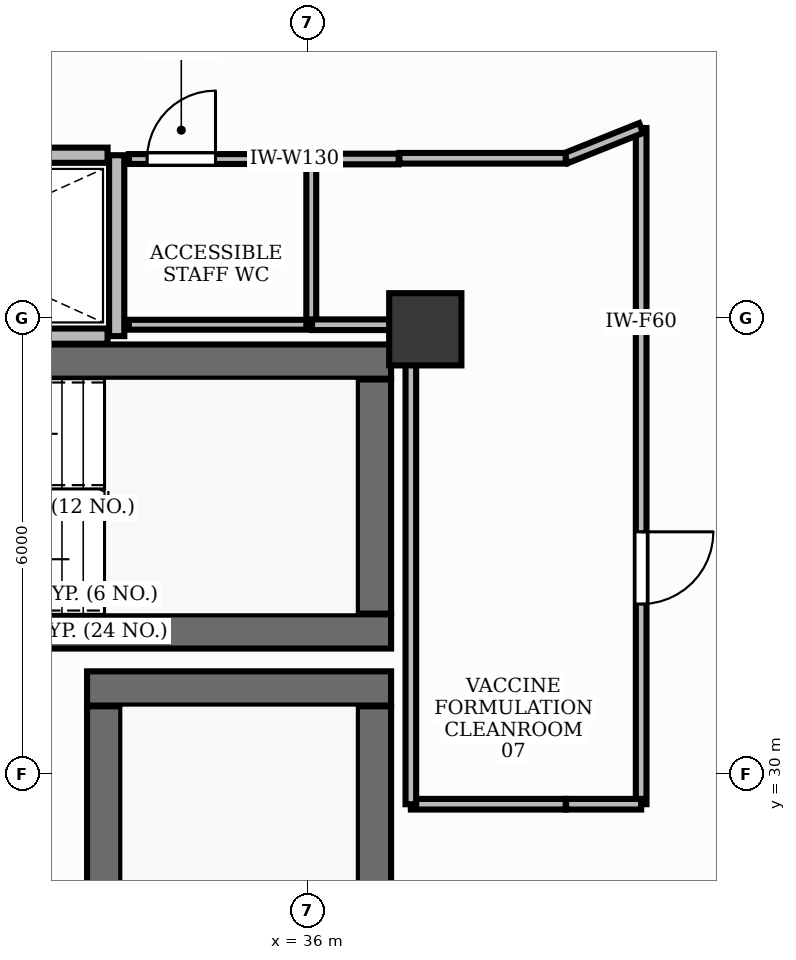
"""IFC4 building model, lengths in metres.
Left out: names, types, materials, properties, quantities, classifications, styles, units other than length and angle.
Written with IfcOpenShell. Run it as: python <this file> out.ifc"""

import sys

from ifc_helpers import new_model, si_unit, direction, frame, frame_2d, origin, origin_2d, place, context, subcontext, project, spatial, rectangle, extrude, element, fill, save


model = new_model("IFC4")
c1 = context("Model", 3, precision=1e-05, world=origin(), true_north=direction((0.0, 1.0)))
c2 = subcontext(c1, "Body", "Model", "MODEL_VIEW")
j1 = project(units=[si_unit("LENGTHUNIT", "METRE"), si_unit("PLANEANGLEUNIT", "RADIAN")], contexts=[c1])
p1 = place(None, origin())
s1 = spatial("IfcSite", under=j1, at=p1, CompositionType="ELEMENT")
p2 = place(p1, origin())
s2 = spatial("IfcBuilding", under=s1, at=p2, CompositionType="ELEMENT")
p3 = place(p2, frame((0.0, 0.0, 98.4)))
s3 = spatial("IfcBuildingStorey", under=s2, at=p3, CompositionType="ELEMENT", Elevation=98.4)
p4 = place(p3, frame((28.852, 35.425, 0.0), z_axis=(0.0, 0.0, 1.0), x_axis=(1.0, 0.0, 0.0)))
e1 = element("IfcWall", 1, at=p4, inside=s3, PredefinedType="SHEAR", context=c2, shape_type="SweptSolid", body=[
    extrude(rectangle(XDim=8.248, YDim=0.45, at=frame_2d((4.124, 0.0))), origin(), (0.0, 0.0, 1.0), 3.9),
])
p5 = place(p3, frame((28.35, 31.875, 0.0), z_axis=(0.0, 0.0, 1.0), x_axis=(1.0, 0.0, 0.0)))
e2 = element("IfcWall", 2, at=p5, inside=s3, PredefinedType="SHEAR", context=c2, shape_type="SweptSolid", body=[
    extrude(rectangle(XDim=8.75, YDim=0.45, at=frame_2d((4.375, 0.0))), origin(), (0.0, 0.0, 1.0), 3.9),
])
p6 = place(p3, frame((36.875, 32.11, 0.0), z_axis=(0.0, 0.0, 1.0), x_axis=(0.0, 1.0, 0.0)))
e3 = element("IfcWall", 3, at=p6, inside=s3, PredefinedType="SHEAR", context=c2, shape_type="SweptSolid", body=[
    extrude(rectangle(XDim=3.08, YDim=0.45, at=frame_2d((1.54, 0.0))), origin(), (0.0, 0.0, 1.0), 3.9),
])
p7 = place(p3, frame((33.1, 31.125, 0.0), z_axis=(0.0, 0.0, 1.0), x_axis=(1.0, 0.0, 0.0)))
e4 = element("IfcWall", 4, at=p7, inside=s3, PredefinedType="SHEAR", context=c2, shape_type="SweptSolid", body=[
    extrude(rectangle(XDim=4.0, YDim=0.45, at=frame_2d((2.0, 0.0))), origin(), (0.0, 0.0, 1.0), 3.9),
])
p8 = place(p3, frame((36.875, 23.11, 0.0), z_axis=(0.0, 0.0, 1.0), x_axis=(0.0, 1.0, 0.0)))
e5 = element("IfcWall", 5, at=p8, inside=s3, PredefinedType="SHEAR", context=c2, shape_type="SweptSolid", body=[
    extrude(rectangle(XDim=7.78, YDim=0.45, at=frame_2d((3.89, 0.0))), origin(), (0.0, 0.0, 1.0), 3.9),
])
p9 = place(p3, frame((33.325, 23.11, 0.0), z_axis=(0.0, 0.0, 1.0), x_axis=(0.0, 1.0, 0.0)))
e6 = element("IfcWall", 6, at=p9, inside=s3, PredefinedType="SHEAR", context=c2, shape_type="SweptSolid", body=[
    extrude(rectangle(XDim=7.78, YDim=0.45, at=frame_2d((3.89, 0.0))), origin(), (0.0, 0.0, 1.0), 3.9),
])
p10 = place(p9, frame((0.2, 0.0, 0.0)))
e7 = element("IfcOpeningElement", 7, at=p10, cuts=e6, PredefinedType="OPENING", context=c2, shape_type="SweptSolid", body=[
    extrude(rectangle(XDim=1.05, YDim=2.15, at=frame_2d((0.525, 1.075))), frame((0.0, 0.24, 0.0), z_axis=(0.0, -1.0, 0.0), x_axis=(1.0, 0.0, 0.0)), (0.0, 0.0, 1.0), 0.48),
])
p11 = place(p3, frame((37.55, 35.85, -0.0), z_axis=(0.0, 0.0, 1.0), x_axis=(1.0, 0.0, 0.0)))
e8 = element("IfcColumn", 8, at=p11, inside=s3, PredefinedType="PILASTER", context=c2, shape_type="SweptSolid", body=[
    extrude(rectangle(XDim=0.95, YDim=0.95, at=origin_2d()), origin(), (0.0, 0.0, 1.0), 3.901),
])
p12 = place(p3, frame((33.49, 35.76, 0.0), z_axis=(0.0, 0.0, 1.0), x_axis=(0.0, 1.0, 0.0)))
e9 = element("IfcWall", 9, at=p12, inside=s3, PredefinedType="PARTITIONING", context=c2, shape_type="SweptSolid", body=[
    extrude(rectangle(XDim=2.38, YDim=0.2, at=frame_2d((1.19, 0.0))), origin(), (0.0, 0.0, 1.0), 2.91),
])
for number, where, z_axis, x_axis in (
    (10, (28.8, 35.76, 0.0), (0.0, 0.0, 1.0), (1.0, 0.0, 0.0)),
    (11, (28.8, 38.14, 0.0), (0.0, 0.0, 1.0), (1.0, 0.0, 0.0)),
):
    element("IfcWall", number, at=place(p3, frame(where, z_axis=z_axis, x_axis=x_axis)), inside=s3, PredefinedType="PARTITIONING", context=c2, shape_type="SweptSolid", body=[
        extrude(rectangle(XDim=4.57, YDim=0.2, at=frame_2d((2.285, 0.0))), origin(), (0.0, 0.0, 1.0), 2.91),
    ])
p13 = place(p3, frame((33.65, 38.09, 0.0), z_axis=(0.0, 0.0, 1.0), x_axis=(1.0, 0.0, 0.0)))
e12 = element("IfcWall", 12, at=p13, inside=s3, PredefinedType="PARTITIONING", context=c2, shape_type="SweptSolid", body=[
    extrude(rectangle(XDim=2.4, YDim=0.13, at=frame_2d((1.2, 0.0))), origin(), (0.0, 0.0, 1.0), 2.91),
])
p14 = place(p13, frame((0.24, 0.0, 0.0)))
e13 = element("IfcOpeningElement", 13, at=p14, cuts=e12, PredefinedType="OPENING", context=c2, shape_type="SweptSolid", body=[
    extrude(rectangle(XDim=0.9, YDim=2.15, at=frame_2d((0.45, 1.075))), frame((0.0, 0.08, 0.0), z_axis=(0.0, -1.0, 0.0), x_axis=(1.0, 0.0, 0.0)), (0.0, 0.0, 1.0), 0.16),
])
p15 = place(p3, frame((40.39, 38.498, 0.0), z_axis=(0.0, 0.0, 1.0), x_axis=(0.0, -1.0, 0.0)))
e14 = element("IfcWall", 14, at=p15, inside=s3, PredefinedType="PARTITIONING", context=c2, shape_type="SweptSolid", body=[
    extrude(rectangle(XDim=8.896, YDim=0.14, at=frame_2d((4.448, 0.0))), origin(), (0.0, 0.0, 1.0), 2.91),
])
p16 = place(p15, frame((5.312, 0.0, 0.0)))
e15 = element("IfcOpeningElement", 15, at=p16, cuts=e14, PredefinedType="OPENING", context=c2, shape_type="SweptSolid", body=[
    extrude(rectangle(XDim=0.95, YDim=2.15, at=frame_2d((0.475, 1.075))), frame((0.0, 0.085, 0.0), z_axis=(0.0, -1.0, 0.0), x_axis=(1.0, 0.0, 0.0)), (0.0, 0.0, 1.0), 0.17),
])
p17 = place(p3, frame((36.05, 35.91, 0.0), z_axis=(0.0, 0.0, 1.0), x_axis=(-1.0, 0.0, 0.0)))
e16 = element("IfcWall", 16, at=p17, inside=s3, PredefinedType="PARTITIONING", context=c2, shape_type="SweptSolid", body=[
    extrude(rectangle(XDim=2.4, YDim=0.13, at=frame_2d((1.2, 0.0))), origin(), (0.0, 0.0, 1.0), 2.91),
])
p18 = place(p3, frame((36.05, 38.09, 0.0), z_axis=(0.0, 0.0, 1.0), x_axis=(0.0, -1.0, 0.0)))
e17 = element("IfcWall", 17, at=p18, inside=s3, PredefinedType="PARTITIONING", context=c2, shape_type="SweptSolid", body=[
    extrude(rectangle(XDim=2.18, YDim=0.13, at=frame_2d((1.09, 0.0))), origin(), (0.0, 0.0, 1.0), 2.91),
])
p19 = place(p3, frame((39.398, 38.1, 0.0), z_axis=(0.0, 0.0, 1.0), x_axis=(0.928098124006, 0.372335698284, 0.0)))
e18 = element("IfcWall", 18, at=p19, inside=s3, PredefinedType="PARTITIONING", context=c2, shape_type="SweptSolid", body=[
    extrude(rectangle(XDim=1.069, YDim=0.14, at=frame_2d((0.534, 0.0))), origin(), (0.0, 0.0, 1.0), 2.91),
])
p20 = place(p3, frame((40.39, 29.602, 0.0), z_axis=(0.0, 0.0, 1.0), x_axis=(-1.0, 0.0, 0.0)))
e19 = element("IfcWall", 19, at=p20, inside=s3, PredefinedType="PARTITIONING", context=c2, shape_type="SweptSolid", body=[
    extrude(rectangle(XDim=0.988, YDim=0.14, at=frame_2d((0.494, 0.0))), origin(), (0.0, 0.0, 1.0), 2.91),
])
p21 = place(p3, frame((39.398, 29.602, 0.0), z_axis=(0.0, 0.0, 1.0), x_axis=(-1.0, 0.0, 0.0)))
e20 = element("IfcWall", 20, at=p21, inside=s3, PredefinedType="PARTITIONING", context=c2, shape_type="SweptSolid", body=[
    extrude(rectangle(XDim=2.038, YDim=0.14, at=frame_2d((1.019, 0.0))), origin(), (0.0, 0.0, 1.0), 2.91),
])
p22 = place(p3, frame((37.36, 29.602, 0.0), z_axis=(0.0, 0.0, 1.0), x_axis=(0.0, 1.0, 0.0)))
e21 = element("IfcWall", 21, at=p22, inside=s3, PredefinedType="PARTITIONING", context=c2, shape_type="SweptSolid", body=[
    extrude(rectangle(XDim=6.298, YDim=0.14, at=frame_2d((3.149, 0.0))), origin(), (0.0, 0.0, 1.0), 2.91),
])
p23 = place(p3, frame((37.35, 35.91, 0.0), z_axis=(0.0, 0.0, 1.0), x_axis=(-1.0, 0.0, 0.0)))
e22 = element("IfcWall", 22, at=p23, inside=s3, PredefinedType="PARTITIONING", context=c2, shape_type="SweptSolid", body=[
    extrude(rectangle(XDim=1.29, YDim=0.14, at=frame_2d((0.645, 0.0))), origin(), (0.0, 0.0, 1.0), 2.91),
])
p24 = place(p3, frame((36.06, 38.09, 0.0), z_axis=(0.0, 0.0, 1.0), x_axis=(1.0, 0.0, 0.0)))
e23 = element("IfcWall", 23, at=p24, inside=s3, PredefinedType="PARTITIONING", context=c2, shape_type="SweptSolid", body=[
    extrude(rectangle(XDim=1.14, YDim=0.14, at=frame_2d((0.57, 0.0))), origin(), (0.0, 0.0, 1.0), 2.91),
])
p25 = place(p3, frame((37.21, 38.1, 0.0), z_axis=(0.0, 0.0, 1.0), x_axis=(1.0, 0.0, 0.0)))
e24 = element("IfcWall", 24, at=p25, inside=s3, PredefinedType="PARTITIONING", context=c2, shape_type="SweptSolid", body=[
    extrude(rectangle(XDim=2.188, YDim=0.14, at=frame_2d((1.094, 0.0))), origin(), (0.0, 0.0, 1.0), 2.91),
])
p26 = place(p14, origin())
e25 = element("IfcDoor", 25, at=p26, inside=s3, OperationType="SINGLE_SWING_RIGHT", PredefinedType="DOOR", context=c2, shape_type="SweptSolid", body=[
    extrude(rectangle(XDim=0.9, YDim=2.15, at=frame_2d((0.45, 1.075))), frame((0.0, 0.025, 0.0), z_axis=(0.0, -1.0, 0.0), x_axis=(1.0, 0.0, 0.0)), (0.0, 0.0, 1.0), 0.05),
])
fill(e13, e25)
p27 = place(p16, origin())
e26 = element("IfcDoor", 26, at=p27, inside=s3, OperationType="SINGLE_SWING_LEFT", PredefinedType="DOOR", context=c2, shape_type="SweptSolid", body=[
    extrude(rectangle(XDim=0.95, YDim=2.15, at=frame_2d((0.475, 1.075))), frame((0.0, 0.025, 0.0), z_axis=(0.0, -1.0, 0.0), x_axis=(1.0, 0.0, 0.0)), (0.0, 0.0, 1.0), 0.05),
])
fill(e15, e26)
save(model, sys.argv[1])
